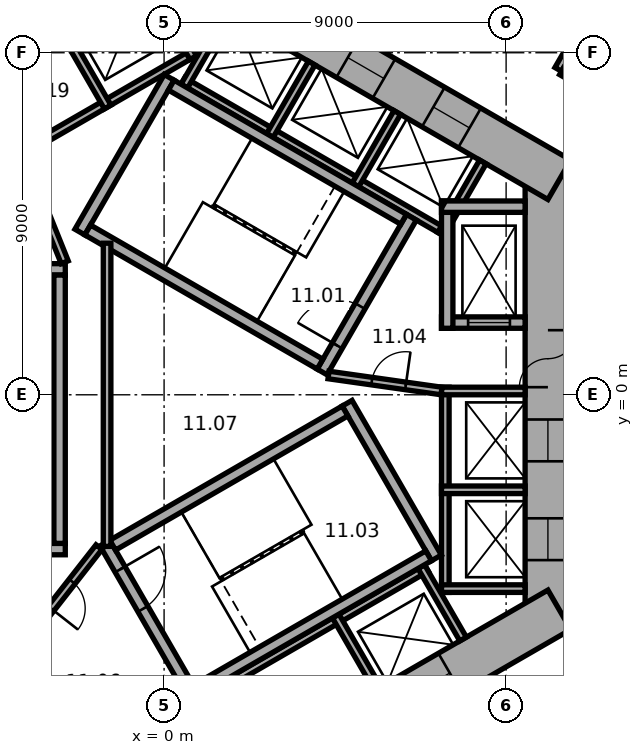
"""IFC4 building model, lengths in metres.
Left out: names, types, materials, properties, quantities, classifications, styles, units other than length and angle.
Written with IfcOpenShell. Run it as: python <this file> out.ifc"""

import sys

from ifc_helpers import new_model, si_unit, direction, frame, frame_2d, origin, place, context, subcontext, project, spatial, rectangle, extrude, element, fill, save


model = new_model("IFC4")
c1 = context("Model", 3, precision=1e-05, world=origin(), true_north=direction((0.0, 1.0)))
c2 = subcontext(c1, "Body", "Model", "MODEL_VIEW")
j1 = project(units=[si_unit("LENGTHUNIT", "METRE"), si_unit("PLANEANGLEUNIT", "RADIAN")], contexts=[c1])
p1 = place(None, origin())
s1 = spatial("IfcSite", under=j1, at=p1, CompositionType="ELEMENT")
p2 = place(p1, origin())
s2 = spatial("IfcBuilding", under=s1, at=p2, CompositionType="ELEMENT")
p3 = place(p2, frame((0.0, 0.0, 57.2)))
s3 = spatial("IfcBuildingStorey", under=s2, at=p3, CompositionType="ELEMENT", Elevation=57.2)
p4 = place(p3, frame((10.1, -6.177, 0.0), z_axis=(0.0, 0.0, 1.0), x_axis=(0.0, 1.0, 0.0)))
e1 = element("IfcWall", 1, at=p4, inside=s3, PredefinedType="SHEAR", context=c2, shape_type="SweptSolid", body=[
    extrude(rectangle(XDim=12.355, YDim=1.2, at=frame_2d((6.177, 0.0))), origin(), (0.0, 0.0, 1.0), 3.3),
])
p5 = place(p4, frame((6.378, 0.0, 0.0)))
e2 = element("IfcOpeningElement", 2, at=p5, cuts=e1, PredefinedType="OPENING", context=c2, shape_type="SweptSolid", body=[
    extrude(rectangle(XDim=1.5, YDim=2.1, at=frame_2d((0.75, 1.05))), frame((0.0, 0.61, 0.0), z_axis=(0.0, -1.0, 0.0), x_axis=(1.0, 0.0, 0.0)), (0.0, 0.0, 1.0), 1.22),
])
p6 = place(p4, frame((1.828, 0.0, 0.0)))
e3 = element("IfcOpeningElement", 3, at=p6, cuts=e1, PredefinedType="OPENING", context=c2, shape_type="SweptSolid", body=[
    extrude(rectangle(XDim=1.1, YDim=2.1, at=frame_2d((0.55, 1.05))), frame((0.0, 0.61, 0.0), z_axis=(0.0, -1.0, 0.0), x_axis=(1.0, 0.0, 0.0)), (0.0, 0.0, 1.0), 1.22),
])
p7 = place(p4, frame((4.427, 0.0, 0.0)))
e4 = element("IfcOpeningElement", 4, at=p7, cuts=e1, PredefinedType="OPENING", context=c2, shape_type="SweptSolid", body=[
    extrude(rectangle(XDim=1.1, YDim=2.1, at=frame_2d((0.55, 1.05))), frame((0.0, 0.61, 0.0), z_axis=(0.0, -1.0, 0.0), x_axis=(1.0, 0.0, 0.0)), (0.0, 0.0, 1.0), 1.22),
])
p8 = place(p3, frame((10.4, 5.658, 0.0), z_axis=(0.0, 0.0, 1.0), x_axis=(-0.866021384402, 0.500006961711, 0.0)))
e5 = element("IfcWall", 5, at=p8, inside=s3, PredefinedType="SHEAR", context=c2, shape_type="SweptSolid", body=[
    extrude(rectangle(XDim=12.355, YDim=1.2, at=frame_2d((6.178, 0.0))), origin(), (0.0, 0.0, 1.0), 3.3),
])
p9 = place(p8, frame((2.728, 0.0, 0.0)))
e6 = element("IfcOpeningElement", 6, at=p9, cuts=e5, PredefinedType="OPENING", context=c2, shape_type="SweptSolid", body=[
    extrude(rectangle(XDim=1.1, YDim=2.1, at=frame_2d((0.55, 1.05))), frame((0.0, 0.61, 0.0), z_axis=(0.0, -1.0, 0.0), x_axis=(1.0, 0.0, 0.0)), (0.0, 0.0, 1.0), 1.22),
])
p10 = place(p8, frame((5.328, 0.0, 0.0)))
e7 = element("IfcOpeningElement", 7, at=p10, cuts=e5, PredefinedType="OPENING", context=c2, shape_type="SweptSolid", body=[
    extrude(rectangle(XDim=1.1, YDim=2.1, at=frame_2d((0.55, 1.05))), frame((0.0, 0.61, 0.0), z_axis=(0.0, -1.0, 0.0), x_axis=(1.0, 0.0, 0.0)), (0.0, 0.0, 1.0), 1.22),
])
p11 = place(p8, frame((7.928, 0.0, 0.0)))
e8 = element("IfcOpeningElement", 8, at=p11, cuts=e5, PredefinedType="OPENING", context=c2, shape_type="SweptSolid", body=[
    extrude(rectangle(XDim=1.1, YDim=2.1, at=frame_2d((0.55, 1.05))), frame((0.0, 0.61, 0.0), z_axis=(0.0, -1.0, 0.0), x_axis=(1.0, 0.0, 0.0)), (0.0, 0.0, 1.0), 1.22),
])
p12 = place(p3, frame((0.3, 11.836, 0.0), z_axis=(0.0, 0.0, 1.0), x_axis=(-0.866021384402, -0.500006961711, 0.0)))
e9 = element("IfcWall", 9, at=p12, inside=s3, PredefinedType="SHEAR", context=c2, shape_type="SweptSolid", body=[
    extrude(rectangle(XDim=12.355, YDim=1.2, at=frame_2d((6.178, 0.0))), origin(), (0.0, 0.0, 1.0), 3.3),
])
p13 = place(p12, frame((6.378, 0.0, 0.0)))
e10 = element("IfcOpeningElement", 10, at=p13, cuts=e9, PredefinedType="OPENING", context=c2, shape_type="SweptSolid", body=[
    extrude(rectangle(XDim=1.5, YDim=2.1, at=frame_2d((0.75, 1.05))), frame((0.0, 0.61, 0.0), z_axis=(0.0, -1.0, 0.0), x_axis=(1.0, 0.0, 0.0)), (0.0, 0.0, 1.0), 1.22),
])
p14 = place(p12, frame((1.828, 0.0, 0.0)))
e11 = element("IfcOpeningElement", 11, at=p14, cuts=e9, PredefinedType="OPENING", context=c2, shape_type="SweptSolid", body=[
    extrude(rectangle(XDim=1.1, YDim=2.1, at=frame_2d((0.55, 1.05))), frame((0.0, 0.61, 0.0), z_axis=(0.0, -1.0, 0.0), x_axis=(1.0, 0.0, 0.0)), (0.0, 0.0, 1.0), 1.22),
])
p15 = place(p3, frame((-10.4, -5.658, 0.0), z_axis=(0.0, 0.0, 1.0), x_axis=(0.866021384402, -0.500006961711, 0.0)))
e12 = element("IfcWall", 12, at=p15, inside=s3, PredefinedType="SHEAR", context=c2, shape_type="SweptSolid", body=[
    extrude(rectangle(XDim=12.355, YDim=1.2, at=frame_2d((6.178, 0.0))), origin(), (0.0, 0.0, 1.0), 3.3),
])
p16 = place(p15, frame((6.378, 0.0, 0.0)))
e13 = element("IfcOpeningElement", 13, at=p16, cuts=e12, PredefinedType="OPENING", context=c2, shape_type="SweptSolid", body=[
    extrude(rectangle(XDim=1.5, YDim=2.1, at=frame_2d((0.75, 1.05))), frame((0.0, 0.61, 0.0), z_axis=(0.0, -1.0, 0.0), x_axis=(1.0, 0.0, 0.0)), (0.0, 0.0, 1.0), 1.22),
])
p17 = place(p15, frame((1.928, 0.0, 0.0)))
e14 = element("IfcOpeningElement", 14, at=p17, cuts=e12, PredefinedType="OPENING", context=c2, shape_type="SweptSolid", body=[
    extrude(rectangle(XDim=0.9, YDim=2.1, at=frame_2d((0.45, 1.05))), frame((0.0, 0.61, 0.0), z_axis=(0.0, -1.0, 0.0), x_axis=(1.0, 0.0, 0.0)), (0.0, 0.0, 1.0), 1.22),
])
p18 = place(p15, frame((4.528, 0.0, 0.0)))
e15 = element("IfcOpeningElement", 15, at=p18, cuts=e12, PredefinedType="OPENING", context=c2, shape_type="SweptSolid", body=[
    extrude(rectangle(XDim=0.9, YDim=2.1, at=frame_2d((0.45, 1.05))), frame((0.0, 0.61, 0.0), z_axis=(0.0, -1.0, 0.0), x_axis=(1.0, 0.0, 0.0)), (0.0, 0.0, 1.0), 1.22),
])
p19 = place(p3, frame((-0.3, -11.836, 0.0), z_axis=(0.0, 0.0, 1.0), x_axis=(0.866021384402, 0.500006961711, 0.0)))
e16 = element("IfcWall", 16, at=p19, inside=s3, PredefinedType="SHEAR", context=c2, shape_type="SweptSolid", body=[
    extrude(rectangle(XDim=12.355, YDim=1.2, at=frame_2d((6.178, 0.0))), origin(), (0.0, 0.0, 1.0), 3.3),
])
p20 = place(p19, frame((4.128, 0.0, 0.0)))
e17 = element("IfcOpeningElement", 17, at=p20, cuts=e16, PredefinedType="OPENING", context=c2, shape_type="SweptSolid", body=[
    extrude(rectangle(XDim=0.9, YDim=2.1, at=frame_2d((0.45, 1.05))), frame((0.0, 0.61, 0.0), z_axis=(0.0, -1.0, 0.0), x_axis=(1.0, 0.0, 0.0)), (0.0, 0.0, 1.0), 1.22),
])
p21 = place(p19, frame((7.928, 0.0, 0.0)))
e18 = element("IfcOpeningElement", 18, at=p21, cuts=e16, PredefinedType="OPENING", context=c2, shape_type="SweptSolid", body=[
    extrude(rectangle(XDim=1.1, YDim=2.1, at=frame_2d((0.55, 1.05))), frame((0.0, 0.61, 0.0), z_axis=(0.0, -1.0, 0.0), x_axis=(1.0, 0.0, 0.0)), (0.0, 0.0, 1.0), 1.22),
])
p22 = place(p3, frame((7.4, -5.2, 0.0), z_axis=(0.0, 0.0, 1.0), x_axis=(0.0, 1.0, 0.0)))
e19 = element("IfcWall", 19, at=p22, inside=s3, PredefinedType="PARTITIONING", context=c2, shape_type="SweptSolid", body=[
    extrude(rectangle(XDim=5.4, YDim=0.2, at=frame_2d((2.7, 0.0))), origin(), (0.0, 0.0, 1.0), 3.05),
])
for number, where, z_axis, x_axis in (
    (20, (7.3, -5.1, 0.0), (0.0, 0.0, 1.0), (1.0, 0.0, 0.0)),
    (21, (7.3, -2.5, 0.0), (0.0, 0.0, 1.0), (1.0, 0.0, 0.0)),
    (22, (7.3, 0.1, 0.0), (0.0, 0.0, 1.0), (1.0, 0.0, 0.0)),
):
    element("IfcWall", number, at=place(p3, frame(where, z_axis=z_axis, x_axis=x_axis)), inside=s3, PredefinedType="PARTITIONING", context=c2, shape_type="SweptSolid", body=[
        extrude(rectangle(XDim=2.2, YDim=0.2, at=frame_2d((1.1, 0.0))), origin(), (0.0, 0.0, 1.0), 3.05),
    ])
p23 = place(p3, frame((7.424, 4.259, 0.0), z_axis=(0.0, 0.0, 1.0), x_axis=(-0.866026010844, 0.49999894854, 0.0)))
e23 = element("IfcWall", 23, at=p23, inside=s3, PredefinedType="PARTITIONING", context=c2, shape_type="SweptSolid", body=[
    extrude(rectangle(XDim=8.0, YDim=0.2, at=frame_2d((4.0, 0.0))), origin(), (0.0, 0.0, 1.0), 3.05),
])
for number, where, z_axis, x_axis in (
    (24, (7.287, 4.222, 0.0), (0.0, 0.0, 1.0), (0.5, 0.866, 0.0)),
    (25, (5.036, 5.522, 0.0), (0.0, 0.0, 1.0), (0.5, 0.866, 0.0)),
    (26, (2.784, 6.822, 0.0), (0.0, 0.0, 1.0), (0.5, 0.866, 0.0)),
    (27, (0.532, 8.122, 0.0), (0.0, 0.0, 1.0), (0.5, 0.866, 0.0)),
):
    element("IfcWall", number, at=place(p3, frame(where, z_axis=z_axis, x_axis=x_axis)), inside=s3, PredefinedType="PARTITIONING", context=c2, shape_type="SweptSolid", body=[
        extrude(rectangle(XDim=2.2, YDim=0.2, at=frame_2d((1.1, 0.0))), origin(), (0.0, 0.0, 1.0), 3.05),
    ])
p24 = place(p3, frame((0.803, 9.009, 0.0), z_axis=(0.0, 0.0, 1.0), x_axis=(-0.866028230842, -0.499995103361, 0.0)))
e28 = element("IfcWall", 28, at=p24, inside=s3, PredefinedType="PARTITIONING", context=c2, shape_type="SweptSolid", body=[
    extrude(rectangle(XDim=5.4, YDim=0.2, at=frame_2d((2.7, 0.0))), origin(), (0.0, 0.0, 1.0), 3.05),
])
p25 = place(p3, frame((0.767, 8.872, 0.0), z_axis=(0.0, 0.0, 1.0), x_axis=(-0.499994660107, 0.866028486751, 0.0)))
e29 = element("IfcWall", 29, at=p25, inside=s3, PredefinedType="PARTITIONING", context=c2, shape_type="SweptSolid", body=[
    extrude(rectangle(XDim=2.2, YDim=0.2, at=frame_2d((1.1, 0.0))), origin(), (0.0, 0.0, 1.0), 3.05),
])
p26 = place(p3, frame((-1.485, 7.572, 0.0), z_axis=(0.0, 0.0, 1.0), x_axis=(-0.50002983664, 0.866008176907, 0.0)))
e30 = element("IfcWall", 30, at=p26, inside=s3, PredefinedType="PARTITIONING", context=c2, shape_type="SweptSolid", body=[
    extrude(rectangle(XDim=2.2, YDim=0.2, at=frame_2d((1.1, 0.0))), origin(), (0.0, 0.0, 1.0), 3.05),
])
p27 = place(p3, frame((-0.024, -8.559, 0.0), z_axis=(0.0, 0.0, 1.0), x_axis=(0.866026010844, 0.49999894854, 0.0)))
e31 = element("IfcWall", 31, at=p27, inside=s3, PredefinedType="PARTITIONING", context=c2, shape_type="SweptSolid", body=[
    extrude(rectangle(XDim=8.0, YDim=0.2, at=frame_2d((4.0, 0.0))), origin(), (0.0, 0.0, 1.0), 3.05),
])
for number, where, z_axis, x_axis in (
    (32, (4.516, -5.822, 0.0), (0.0, 0.0, 1.0), (0.5, -0.866, 0.0)),
    (33, (6.768, -4.522, 0.0), (0.0, 0.0, 1.0), (0.5, -0.866, 0.0)),
):
    element("IfcWall", number, at=place(p3, frame(where, z_axis=z_axis, x_axis=x_axis)), inside=s3, PredefinedType="PARTITIONING", context=c2, shape_type="SweptSolid", body=[
        extrude(rectangle(XDim=2.2, YDim=0.2, at=frame_2d((1.1, 0.0))), origin(), (0.0, 0.0, 1.0), 3.05),
    ])
p28 = place(p3, frame((4.158, 0.602, 0.0), z_axis=(0.0, 0.0, 1.0), x_axis=(0.499977259774, 0.866038532462, 0.0)))
e34 = element("IfcWall", 34, at=p28, inside=s3, PredefinedType="SHEAR", context=c2, shape_type="SweptSolid", body=[
    extrude(rectangle(XDim=4.7, YDim=0.3, at=frame_2d((2.35, 0.0))), origin(), (0.0, 0.0, 1.0), 3.05),
])
p29 = place(p28, frame((0.8, 0.0, 0.0)))
e35 = element("IfcOpeningElement", 35, at=p29, cuts=e34, PredefinedType="OPENING", context=c2, shape_type="SweptSolid", body=[
    extrude(rectangle(XDim=1.2, YDim=2.1, at=frame_2d((0.6, 1.05))), frame((0.0, 0.16, 0.0), z_axis=(0.0, -1.0, 0.0), x_axis=(1.0, 0.0, 0.0)), (0.0, 0.0, 1.0), 0.32),
])
p30 = place(p3, frame((-2.216, 4.282, 0.0), z_axis=(0.0, 0.0, 1.0), x_axis=(0.499977259774, 0.866038532462, 0.0)))
e36 = element("IfcWall", 36, at=p30, inside=s3, PredefinedType="SHEAR", context=c2, shape_type="SweptSolid", body=[
    extrude(rectangle(XDim=4.7, YDim=0.3, at=frame_2d((2.35, 0.0))), origin(), (0.0, 0.0, 1.0), 3.05),
])
for number, where, z_axis, x_axis in (
    (37, (4.103, 0.807, 0.0), (0.0, 0.0, 1.0), (-0.866, 0.5, 0.0)),
    (38, (6.303, 4.617, 0.0), (0.0, 0.0, 1.0), (-0.866, 0.5, 0.0)),
):
    element("IfcWall", number, at=place(p3, frame(where, z_axis=z_axis, x_axis=x_axis)), inside=s3, PredefinedType="SHEAR", context=c2, shape_type="SweptSolid", body=[
        extrude(rectangle(XDim=7.06, YDim=0.3, at=frame_2d((3.53, 0.0))), origin(), (0.0, 0.0, 1.0), 3.05),
    ])
p31 = place(p3, frame((-2.6, 3.3, 0.0), z_axis=(0.0, 0.0, 1.0), x_axis=(-1.0, 0.0, 0.0)))
e39 = element("IfcWall", 39, at=p31, inside=s3, PredefinedType="SHEAR", context=c2, shape_type="SweptSolid", body=[
    extrude(rectangle(XDim=4.7, YDim=0.3, at=frame_2d((2.35, 0.0))), origin(), (0.0, 0.0, 1.0), 3.05),
])
p32 = place(p31, frame((0.8, 0.0, 0.0)))
e40 = element("IfcOpeningElement", 40, at=p32, cuts=e39, PredefinedType="OPENING", context=c2, shape_type="SweptSolid", body=[
    extrude(rectangle(XDim=1.2, YDim=2.1, at=frame_2d((0.6, 1.05))), frame((0.0, 0.16, 0.0), z_axis=(0.0, -1.0, 0.0), x_axis=(1.0, 0.0, 0.0)), (0.0, 0.0, 1.0), 0.32),
])
p33 = place(p3, frame((-2.6, -4.06, 0.0), z_axis=(0.0, 0.0, 1.0), x_axis=(-1.0, 0.0, 0.0)))
e41 = element("IfcWall", 41, at=p33, inside=s3, PredefinedType="SHEAR", context=c2, shape_type="SweptSolid", body=[
    extrude(rectangle(XDim=4.7, YDim=0.3, at=frame_2d((2.35, 0.0))), origin(), (0.0, 0.0, 1.0), 3.05),
])
p34 = place(p3, frame((-2.75, 3.15, 0.0), z_axis=(0.0, 0.0, 1.0), x_axis=(0.0, -1.0, 0.0)))
e42 = element("IfcWall", 42, at=p34, inside=s3, PredefinedType="SHEAR", context=c2, shape_type="SweptSolid", body=[
    extrude(rectangle(XDim=7.06, YDim=0.3, at=frame_2d((3.53, 0.0))), origin(), (0.0, 0.0, 1.0), 3.05),
])
p35 = place(p3, frame((-1.558, -3.902, 0.0), z_axis=(0.0, 0.0, 1.0), x_axis=(0.499977259774, -0.866038532462, 0.0)))
e43 = element("IfcWall", 43, at=p35, inside=s3, PredefinedType="SHEAR", context=c2, shape_type="SweptSolid", body=[
    extrude(rectangle(XDim=4.7, YDim=0.3, at=frame_2d((2.35, 0.0))), origin(), (0.0, 0.0, 1.0), 3.05),
])
p36 = place(p35, frame((0.8, 0.0, 0.0)))
e44 = element("IfcOpeningElement", 44, at=p36, cuts=e43, PredefinedType="OPENING", context=c2, shape_type="SweptSolid", body=[
    extrude(rectangle(XDim=1.2, YDim=2.1, at=frame_2d((0.6, 1.05))), frame((0.0, 0.16, 0.0), z_axis=(0.0, -1.0, 0.0), x_axis=(1.0, 0.0, 0.0)), (0.0, 0.0, 1.0), 0.32),
])
p37 = place(p3, frame((4.816, -0.222, 0.0), z_axis=(0.0, 0.0, 1.0), x_axis=(0.499977259774, -0.866038532462, 0.0)))
e45 = element("IfcWall", 45, at=p37, inside=s3, PredefinedType="SHEAR", context=c2, shape_type="SweptSolid", body=[
    extrude(rectangle(XDim=4.7, YDim=0.3, at=frame_2d((2.35, 0.0))), origin(), (0.0, 0.0, 1.0), 3.05),
])
for number, where, z_axis, x_axis in (
    (46, (-1.353, -3.957, 0.0), (0.0, 0.0, 1.0), (0.866, 0.5, 0.0)),
    (47, (0.847, -7.767, 0.0), (0.0, 0.0, 1.0), (0.866, 0.5, 0.0)),
):
    element("IfcWall", number, at=place(p3, frame(where, z_axis=z_axis, x_axis=x_axis)), inside=s3, PredefinedType="SHEAR", context=c2, shape_type="SweptSolid", body=[
        extrude(rectangle(XDim=7.06, YDim=0.3, at=frame_2d((3.53, 0.0))), origin(), (0.0, 0.0, 1.0), 3.05),
    ])
p38 = place(p3, frame((7.3, 1.9, 0.0), z_axis=(0.0, 0.0, 1.0), x_axis=(1.0, 0.0, 0.0)))
e48 = element("IfcWall", 48, at=p38, inside=s3, PredefinedType="SHEAR", context=c2, shape_type="SweptSolid", body=[
    extrude(rectangle(XDim=2.2, YDim=0.3, at=frame_2d((1.1, 0.0))), origin(), (0.0, 0.0, 1.0), 3.05),
])
p39 = place(p38, frame((0.7, 0.0, 0.0)))
e49 = element("IfcOpeningElement", 49, at=p39, cuts=e48, PredefinedType="OPENING", context=c2, shape_type="SweptSolid", body=[
    extrude(rectangle(XDim=1.1, YDim=2.1, at=frame_2d((0.55, 1.05))), frame((0.0, 0.16, 0.0), z_axis=(0.0, -1.0, 0.0), x_axis=(1.0, 0.0, 0.0)), (0.0, 0.0, 1.0), 0.32),
])
p40 = place(p3, frame((7.45, 1.75, 0.0), z_axis=(0.0, 0.0, 1.0), x_axis=(0.0, 1.0, 0.0)))
e50 = element("IfcWall", 50, at=p40, inside=s3, PredefinedType="SHEAR", context=c2, shape_type="SweptSolid", body=[
    extrude(rectangle(XDim=3.35, YDim=0.3, at=frame_2d((1.675, 0.0))), origin(), (0.0, 0.0, 1.0), 3.05),
])
p41 = place(p3, frame((7.3, 4.95, 0.0), z_axis=(0.0, 0.0, 1.0), x_axis=(1.0, 0.0, 0.0)))
e51 = element("IfcWall", 51, at=p41, inside=s3, PredefinedType="SHEAR", context=c2, shape_type="SweptSolid", body=[
    extrude(rectangle(XDim=2.2, YDim=0.3, at=frame_2d((1.1, 0.0))), origin(), (0.0, 0.0, 1.0), 3.05),
])
p42 = place(p3, frame((4.327, 0.521, 0.0), z_axis=(0.0, 0.0, 1.0), x_axis=(0.990124376366, -0.14019172346, 0.0)))
e52 = element("IfcWall", 52, at=p42, inside=s3, PredefinedType="PARTITIONING", context=c2, shape_type="SweptSolid", body=[
    extrude(rectangle(XDim=3.002, YDim=0.2, at=frame_2d((1.501, 0.0))), origin(), (0.0, 0.0, 1.0), 3.05),
])
p43 = place(p42, frame((1.15, 0.0, 0.0)))
e53 = element("IfcOpeningElement", 53, at=p43, cuts=e52, PredefinedType="OPENING", context=c2, shape_type="SweptSolid", body=[
    extrude(rectangle(XDim=0.9, YDim=2.1, at=frame_2d((0.45, 1.05))), frame((0.0, 0.11, 0.0), z_axis=(0.0, -1.0, 0.0), x_axis=(1.0, 0.0, 0.0)), (0.0, 0.0, 1.0), 0.22),
])
p44 = place(p3, frame((-2.615, 3.487, 0.0), z_axis=(0.0, 0.0, 1.0), x_axis=(-0.373576831041, 0.92759924068, 0.0)))
e54 = element("IfcWall", 54, at=p44, inside=s3, PredefinedType="PARTITIONING", context=c2, shape_type="SweptSolid", body=[
    extrude(rectangle(XDim=3.002, YDim=0.2, at=frame_2d((1.501, 0.0))), origin(), (0.0, 0.0, 1.0), 3.05),
])
p45 = place(p3, frame((-1.712, -4.008, 0.0), z_axis=(0.0, 0.0, 1.0), x_axis=(-0.616549420702, -0.787316208287, 0.0)))
e55 = element("IfcWall", 55, at=p45, inside=s3, PredefinedType="PARTITIONING", context=c2, shape_type="SweptSolid", body=[
    extrude(rectangle(XDim=3.002, YDim=0.2, at=frame_2d((1.501, 0.0))), origin(), (0.0, 0.0, 1.0), 3.05),
])
p46 = place(p45, frame((1.15, 0.0, 0.0)))
e56 = element("IfcOpeningElement", 56, at=p46, cuts=e55, PredefinedType="OPENING", context=c2, shape_type="SweptSolid", body=[
    extrude(rectangle(XDim=0.9, YDim=2.1, at=frame_2d((0.45, 1.05))), frame((0.0, 0.11, 0.0), z_axis=(0.0, -1.0, 0.0), x_axis=(1.0, 0.0, 0.0)), (0.0, 0.0, 1.0), 0.22),
])
p47 = place(p3, frame((-1.5, -3.988, 0.0), z_axis=(0.0, 0.0, 1.0), x_axis=(0.0, 1.0, 0.0)))
e57 = element("IfcWall", 57, at=p47, inside=s3, PredefinedType="PARTITIONING", context=c2, shape_type="SweptSolid", body=[
    extrude(rectangle(XDim=7.977, YDim=0.2, at=frame_2d((3.988, 0.0))), origin(), (0.0, 0.0, 1.0), 3.05),
])
p48 = place(p3, frame((10.371, 8.561, 0.0), z_axis=(0.0, 0.0, 1.0), x_axis=(0.50004290449, 0.866000631449, 0.0)))
e58 = element("IfcWall", 58, at=p48, inside=s3, PredefinedType="PARTITIONING", context=c2, shape_type="SweptSolid", body=[
    extrude(rectangle(XDim=0.901, YDim=0.2, at=frame_2d((0.451, 0.0))), origin(), (0.0, 0.0, 1.0), 3.05),
])
p49 = place(p3, frame((11.566, 7.871, 0.0), z_axis=(0.0, 0.0, 1.0), x_axis=(-0.866004557827, 0.500036104519, 0.0)))
e59 = element("IfcWall", 59, at=p49, inside=s3, PredefinedType="PARTITIONING", context=c2, shape_type="SweptSolid", body=[
    extrude(rectangle(XDim=1.28, YDim=0.2, at=frame_2d((0.64, 0.0))), origin(), (0.0, 0.0, 1.0), 3.05),
])
p50 = place(p5, origin())
e60 = element("IfcDoor", 60, at=p50, inside=s3, OperationType="DOUBLE_DOOR_SINGLE_SWING", PredefinedType="DOOR", context=c2, shape_type="SweptSolid", body=[
    extrude(rectangle(XDim=1.5, YDim=2.1, at=frame_2d((0.75, 1.05))), frame((0.0, 0.025, 0.0), z_axis=(0.0, -1.0, 0.0), x_axis=(1.0, 0.0, 0.0)), (0.0, 0.0, 1.0), 0.05),
])
fill(e2, e60)
p51 = place(p29, origin())
e61 = element("IfcDoor", 61, at=p51, inside=s3, OperationType="SINGLE_SWING_RIGHT", PredefinedType="DOOR", context=c2, shape_type="SweptSolid", body=[
    extrude(rectangle(XDim=1.2, YDim=2.1, at=frame_2d((0.6, 1.05))), frame((0.0, 0.025, 0.0), z_axis=(0.0, -1.0, 0.0), x_axis=(1.0, 0.0, 0.0)), (0.0, 0.0, 1.0), 0.05),
])
fill(e35, e61)
p52 = place(p36, origin())
e62 = element("IfcDoor", 62, at=p52, inside=s3, OperationType="SINGLE_SWING_RIGHT", PredefinedType="DOOR", context=c2, shape_type="SweptSolid", body=[
    extrude(rectangle(XDim=1.2, YDim=2.1, at=frame_2d((0.6, 1.05))), frame((0.0, 0.025, 0.0), z_axis=(0.0, -1.0, 0.0), x_axis=(1.0, 0.0, 0.0)), (0.0, 0.0, 1.0), 0.05),
])
fill(e44, e62)
p53 = place(p43, origin())
e63 = element("IfcDoor", 63, at=p53, inside=s3, OperationType="SINGLE_SWING_LEFT", PredefinedType="DOOR", context=c2, shape_type="SweptSolid", body=[
    extrude(rectangle(XDim=0.9, YDim=2.1, at=frame_2d((0.45, 1.05))), frame((0.0, 0.025, 0.0), z_axis=(0.0, -1.0, 0.0), x_axis=(1.0, 0.0, 0.0)), (0.0, 0.0, 1.0), 0.05),
])
fill(e53, e63)
p54 = place(p46, origin())
e64 = element("IfcDoor", 64, at=p54, inside=s3, OperationType="SINGLE_SWING_LEFT", PredefinedType="DOOR", context=c2, shape_type="SweptSolid", body=[
    extrude(rectangle(XDim=0.9, YDim=2.1, at=frame_2d((0.45, 1.05))), frame((0.0, 0.025, 0.0), z_axis=(0.0, -1.0, 0.0), x_axis=(1.0, 0.0, 0.0)), (0.0, 0.0, 1.0), 0.05),
])
fill(e56, e64)
p55 = place(p39, origin())
e65 = element("IfcDoor", 65, at=p55, inside=s3, OperationType="DOUBLE_DOOR_SLIDING", PredefinedType="DOOR", context=c2, shape_type="SweptSolid", body=[
    extrude(rectangle(XDim=1.1, YDim=2.1, at=frame_2d((0.55, 1.05))), frame((0.0, 0.025, 0.0), z_axis=(0.0, -1.0, 0.0), x_axis=(1.0, 0.0, 0.0)), (0.0, 0.0, 1.0), 0.05),
])
fill(e49, e65)
p56 = place(p6, origin())
e66 = element("IfcDoor", 66, at=p56, inside=s3, OperationType="DOUBLE_DOOR_SLIDING", PredefinedType="DOOR", context=c2, shape_type="SweptSolid", body=[
    extrude(rectangle(XDim=1.1, YDim=2.1, at=frame_2d((0.55, 1.05))), frame((0.0, 0.025, 0.0), z_axis=(0.0, -1.0, 0.0), x_axis=(1.0, 0.0, 0.0)), (0.0, 0.0, 1.0), 0.05),
])
fill(e3, e66)
p57 = place(p7, origin())
e67 = element("IfcDoor", 67, at=p57, inside=s3, OperationType="DOUBLE_DOOR_SLIDING", PredefinedType="DOOR", context=c2, shape_type="SweptSolid", body=[
    extrude(rectangle(XDim=1.1, YDim=2.1, at=frame_2d((0.55, 1.05))), frame((0.0, 0.025, 0.0), z_axis=(0.0, -1.0, 0.0), x_axis=(1.0, 0.0, 0.0)), (0.0, 0.0, 1.0), 0.05),
])
fill(e4, e67)
p58 = place(p9, origin())
e68 = element("IfcDoor", 68, at=p58, inside=s3, OperationType="DOUBLE_DOOR_SLIDING", PredefinedType="DOOR", context=c2, shape_type="SweptSolid", body=[
    extrude(rectangle(XDim=1.1, YDim=2.1, at=frame_2d((0.55, 1.05))), frame((0.0, 0.025, 0.0), z_axis=(0.0, -1.0, 0.0), x_axis=(1.0, 0.0, 0.0)), (0.0, 0.0, 1.0), 0.05),
])
fill(e6, e68)
p59 = place(p10, origin())
e69 = element("IfcDoor", 69, at=p59, inside=s3, OperationType="DOUBLE_DOOR_SLIDING", PredefinedType="DOOR", context=c2, shape_type="SweptSolid", body=[
    extrude(rectangle(XDim=1.1, YDim=2.1, at=frame_2d((0.55, 1.05))), frame((0.0, 0.025, 0.0), z_axis=(0.0, -1.0, 0.0), x_axis=(1.0, 0.0, 0.0)), (0.0, 0.0, 1.0), 0.05),
])
fill(e7, e69)
p60 = place(p21, origin())
e70 = element("IfcDoor", 70, at=p60, inside=s3, OperationType="DOUBLE_DOOR_SLIDING", PredefinedType="DOOR", context=c2, shape_type="SweptSolid", body=[
    extrude(rectangle(XDim=1.1, YDim=2.1, at=frame_2d((0.55, 1.05))), frame((0.0, 0.025, 0.0), z_axis=(0.0, -1.0, 0.0), x_axis=(1.0, 0.0, 0.0)), (0.0, 0.0, 1.0), 0.05),
])
fill(e18, e70)
save(model, sys.argv[1])
